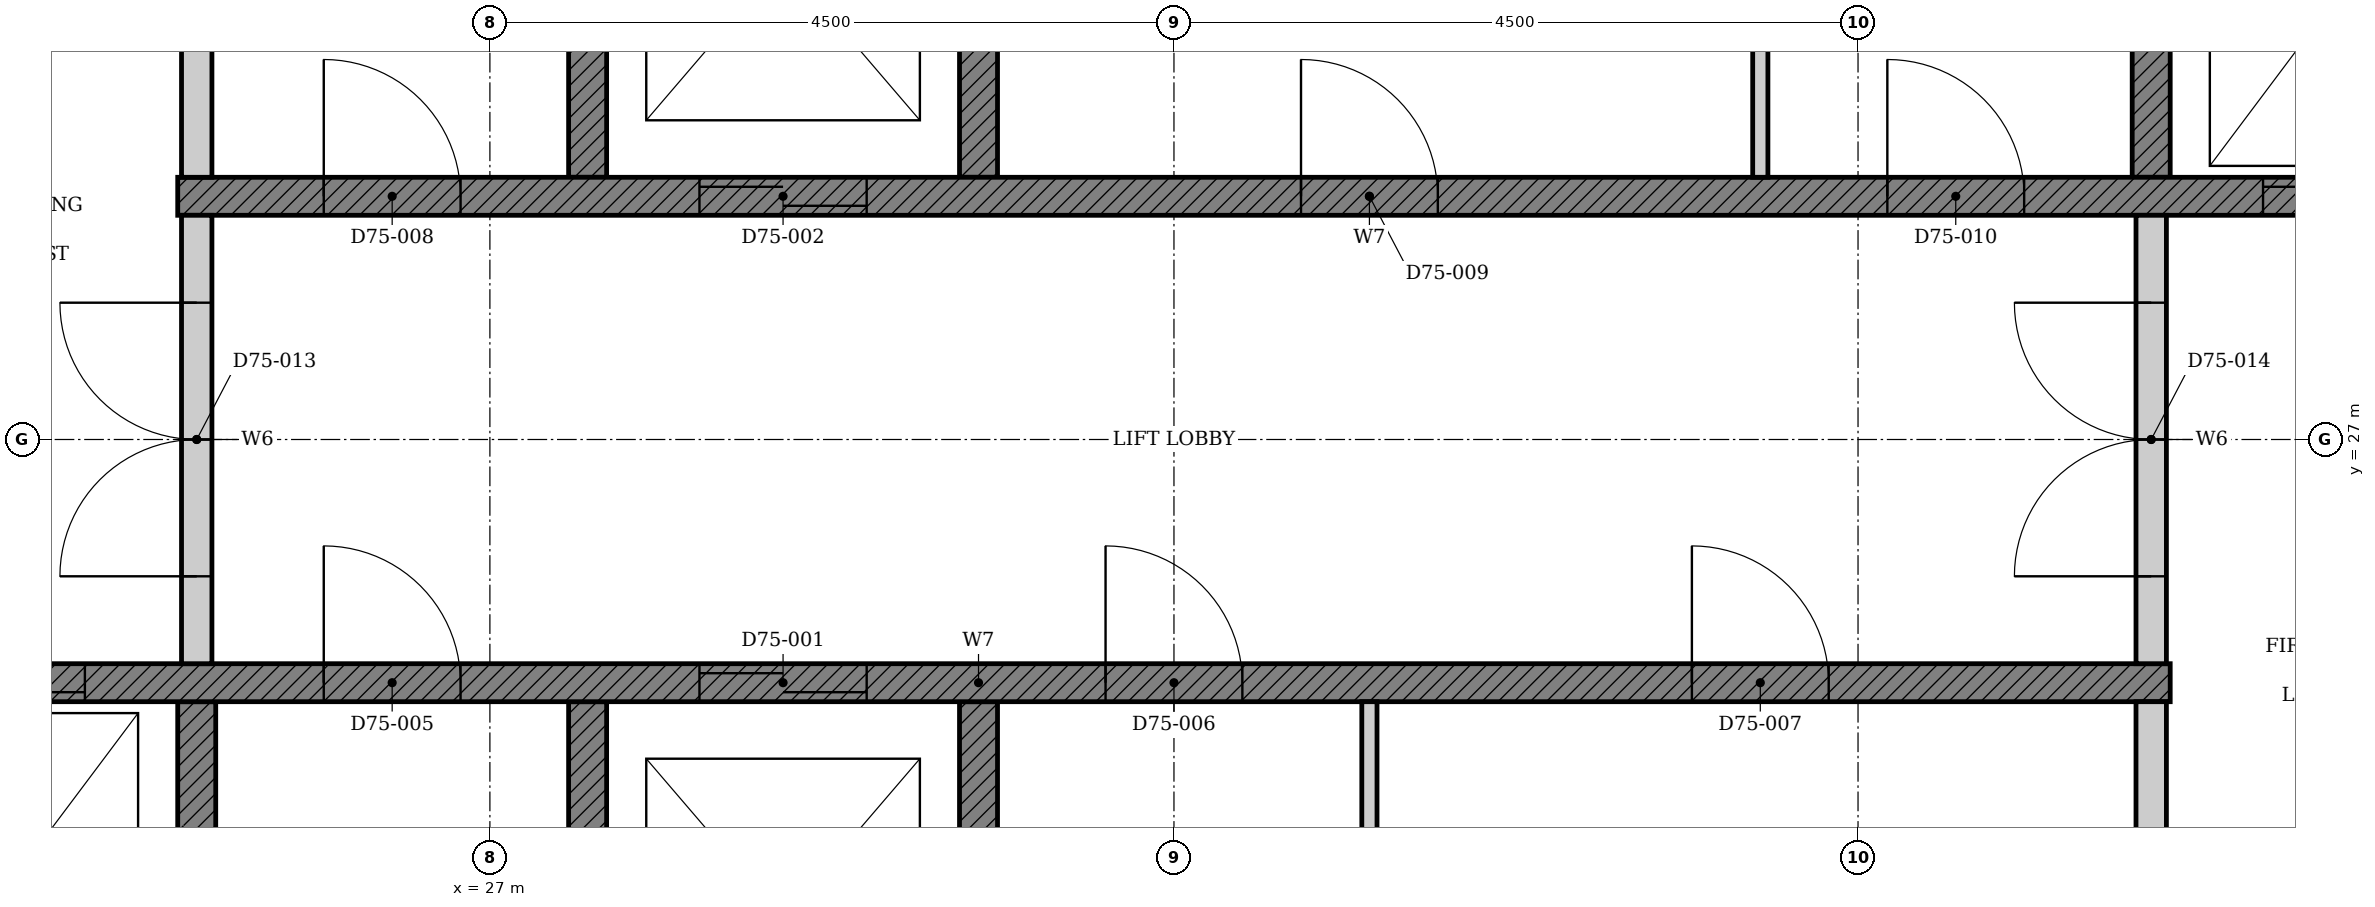
"""IFC4 building model, lengths in metres.
Left out: names, types, materials, properties, quantities, classifications, styles, units other than length and angle.
Written with IfcOpenShell. Run it as: python <this file> out.ifc"""

import sys

from ifc_helpers import new_model, si_unit, direction, frame, frame_2d, origin, place, context, subcontext, project, spatial, polyline, rectangle, outline, extrude, element, fill, save


model = new_model("IFC4")
c1 = context("Model", 3, precision=1e-05, world=origin(), true_north=direction((0.0, 1.0)))
c2 = subcontext(c1, "Body", "Model", "MODEL_VIEW")
j1 = project(units=[si_unit("LENGTHUNIT", "METRE"), si_unit("PLANEANGLEUNIT", "RADIAN")], contexts=[c1])
p1 = place(None, origin())
s1 = spatial("IfcSite", under=j1, at=p1, CompositionType="ELEMENT")
p2 = place(p1, origin())
s2 = spatial("IfcBuilding", under=s1, at=p2, CompositionType="ELEMENT")
p3 = place(p2, frame((0.0, 0.0, 294.5)))
s3 = spatial("IfcBuildingStorey", under=s2, at=p3, CompositionType="ELEMENT", Elevation=294.5)
p4 = place(p3, origin())
e1 = element("IfcWall", 1, at=p4, inside=s3, PredefinedType="SHEAR", context=c2, shape_type="SweptSolid", body=[
    extrude(outline(polyline([(22.375, 22.35), (25.197, 22.35), (25.197, 25.275), (24.947, 25.275), (24.947, 22.65), (22.625, 22.65), (22.625, 25.275), (22.375, 25.275), (22.375, 22.35)])), origin(), (0.0, 0.0, 1.0), 3.4),
])
p5 = place(p3, origin())
e2 = element("IfcWall", 2, at=p5, inside=s3, PredefinedType="SHEAR", context=c2, shape_type="SweptSolid", body=[
    extrude(outline(polyline([(27.518, 22.35), (30.339, 22.35), (30.339, 25.275), (30.089, 25.275), (30.089, 22.65), (27.768, 22.65), (27.768, 25.275), (27.518, 25.275), (27.518, 22.35)])), origin(), (0.0, 0.0, 1.0), 3.4),
])
p6 = place(p3, origin())
e3 = element("IfcWall", 3, at=p6, inside=s3, PredefinedType="SHEAR", context=c2, shape_type="SweptSolid", body=[
    extrude(outline(polyline([(27.518, 28.725), (27.768, 28.725), (27.768, 31.35), (30.089, 31.35), (30.089, 28.725), (30.339, 28.725), (30.339, 31.65), (27.518, 31.65), (27.518, 28.725)])), origin(), (0.0, 0.0, 1.0), 3.4),
])
p7 = place(p3, origin())
e4 = element("IfcWall", 4, at=p7, inside=s3, PredefinedType="SHEAR", context=c2, shape_type="SweptSolid", body=[
    extrude(outline(polyline([(37.803, 28.725), (38.053, 28.725), (38.053, 31.35), (40.375, 31.35), (40.375, 28.725), (40.625, 28.725), (40.625, 31.65), (37.803, 31.65), (37.803, 28.725)])), origin(), (0.0, 0.0, 1.0), 3.4),
])
p8 = place(p3, frame((22.375, 25.4, 0.0), z_axis=(0.0, 0.0, 1.0), x_axis=(1.0, 0.0, 0.0)))
e5 = element("IfcWall", 5, at=p8, inside=s3, PredefinedType="SHEAR", context=c2, shape_type="SweptSolid", body=[
    extrude(rectangle(XDim=15.678, YDim=0.25, at=frame_2d((7.839, 0.0))), origin(), (0.0, 0.0, 1.0), 3.4),
])
p9 = place(p8, frame((6.004, 0.0, 0.0)))
e6 = element("IfcOpeningElement", 6, at=p9, cuts=e5, PredefinedType="OPENING", context=c2, shape_type="SweptSolid", body=[
    extrude(rectangle(XDim=1.1, YDim=2.1, at=frame_2d((0.55, 1.05))), frame((0.0, 0.135, 0.0), z_axis=(0.0, -1.0, 0.0), x_axis=(1.0, 0.0, 0.0)), (0.0, 0.0, 1.0), 0.27),
])
p10 = place(p8, frame((0.861, 0.0, 0.0)))
e7 = element("IfcOpeningElement", 7, at=p10, cuts=e5, PredefinedType="OPENING", context=c2, shape_type="SweptSolid", body=[
    extrude(rectangle(XDim=1.1, YDim=2.1, at=frame_2d((0.55, 1.05))), frame((0.0, 0.135, 0.0), z_axis=(0.0, -1.0, 0.0), x_axis=(1.0, 0.0, 0.0)), (0.0, 0.0, 1.0), 0.27),
])
p11 = place(p8, frame((3.532, 0.0, 0.0)))
e8 = element("IfcOpeningElement", 8, at=p11, cuts=e5, PredefinedType="OPENING", context=c2, shape_type="SweptSolid", body=[
    extrude(rectangle(XDim=0.9, YDim=2.1, at=frame_2d((0.45, 1.05))), frame((0.0, 0.135, 0.0), z_axis=(0.0, -1.0, 0.0), x_axis=(1.0, 0.0, 0.0)), (0.0, 0.0, 1.0), 0.27),
])
p12 = place(p8, frame((8.675, 0.0, 0.0)))
e9 = element("IfcOpeningElement", 9, at=p12, cuts=e5, PredefinedType="OPENING", context=c2, shape_type="SweptSolid", body=[
    extrude(rectangle(XDim=0.9, YDim=2.1, at=frame_2d((0.45, 1.05))), frame((0.0, 0.135, 0.0), z_axis=(0.0, -1.0, 0.0), x_axis=(1.0, 0.0, 0.0)), (0.0, 0.0, 1.0), 0.27),
])
p13 = place(p8, frame((12.532, 0.0, 0.0)))
e10 = element("IfcOpeningElement", 10, at=p13, cuts=e5, PredefinedType="OPENING", context=c2, shape_type="SweptSolid", body=[
    extrude(rectangle(XDim=0.9, YDim=2.1, at=frame_2d((0.45, 1.05))), frame((0.0, 0.135, 0.0), z_axis=(0.0, -1.0, 0.0), x_axis=(1.0, 0.0, 0.0)), (0.0, 0.0, 1.0), 0.27),
])
p14 = place(p3, frame((24.947, 28.6, 0.0), z_axis=(0.0, 0.0, 1.0), x_axis=(1.0, 0.0, 0.0)))
e11 = element("IfcWall", 11, at=p14, inside=s3, PredefinedType="SHEAR", context=c2, shape_type="SweptSolid", body=[
    extrude(rectangle(XDim=15.678, YDim=0.25, at=frame_2d((7.839, 0.0))), origin(), (0.0, 0.0, 1.0), 3.4),
])
p15 = place(p14, frame((3.432, 0.0, 0.0)))
e12 = element("IfcOpeningElement", 12, at=p15, cuts=e11, PredefinedType="OPENING", context=c2, shape_type="SweptSolid", body=[
    extrude(rectangle(XDim=1.1, YDim=2.1, at=frame_2d((0.55, 1.05))), frame((0.0, 0.135, 0.0), z_axis=(0.0, -1.0, 0.0), x_axis=(1.0, 0.0, 0.0)), (0.0, 0.0, 1.0), 0.27),
])
p16 = place(p14, frame((13.718, 0.0, 0.0)))
e13 = element("IfcOpeningElement", 13, at=p16, cuts=e11, PredefinedType="OPENING", context=c2, shape_type="SweptSolid", body=[
    extrude(rectangle(XDim=1.1, YDim=2.1, at=frame_2d((0.55, 1.05))), frame((0.0, 0.135, 0.0), z_axis=(0.0, -1.0, 0.0), x_axis=(1.0, 0.0, 0.0)), (0.0, 0.0, 1.0), 0.27),
])
p17 = place(p14, frame((0.961, 0.0, 0.0)))
e14 = element("IfcOpeningElement", 14, at=p17, cuts=e11, PredefinedType="OPENING", context=c2, shape_type="SweptSolid", body=[
    extrude(rectangle(XDim=0.9, YDim=2.1, at=frame_2d((0.45, 1.05))), frame((0.0, 0.135, 0.0), z_axis=(0.0, -1.0, 0.0), x_axis=(1.0, 0.0, 0.0)), (0.0, 0.0, 1.0), 0.27),
])
p18 = place(p14, frame((7.389, 0.0, 0.0)))
e15 = element("IfcOpeningElement", 15, at=p18, cuts=e11, PredefinedType="OPENING", context=c2, shape_type="SweptSolid", body=[
    extrude(rectangle(XDim=0.9, YDim=2.1, at=frame_2d((0.45, 1.05))), frame((0.0, 0.135, 0.0), z_axis=(0.0, -1.0, 0.0), x_axis=(1.0, 0.0, 0.0)), (0.0, 0.0, 1.0), 0.27),
])
p19 = place(p14, frame((11.246, 0.0, 0.0)))
e16 = element("IfcOpeningElement", 16, at=p19, cuts=e11, PredefinedType="OPENING", context=c2, shape_type="SweptSolid", body=[
    extrude(rectangle(XDim=0.9, YDim=2.1, at=frame_2d((0.45, 1.05))), frame((0.0, 0.135, 0.0), z_axis=(0.0, -1.0, 0.0), x_axis=(1.0, 0.0, 0.0)), (0.0, 0.0, 1.0), 0.27),
])
p20 = place(p3, frame((37.928, 22.65, 0.0), z_axis=(0.0, 0.0, 1.0), x_axis=(0.0, 1.0, 0.0)))
e17 = element("IfcWall", 17, at=p20, inside=s3, PredefinedType="PARTITIONING", context=c2, shape_type="SweptSolid", body=[
    extrude(rectangle(XDim=2.625, YDim=0.2, at=frame_2d((1.312, 0.0))), origin(), (0.0, 0.0, 1.0), 3.4),
])
p21 = place(p3, frame((32.786, 22.65, 0.0), z_axis=(0.0, 0.0, 1.0), x_axis=(0.0, 1.0, 0.0)))
e18 = element("IfcWall", 18, at=p21, inside=s3, PredefinedType="PARTITIONING", context=c2, shape_type="SweptSolid", body=[
    extrude(rectangle(XDim=2.625, YDim=0.1, at=frame_2d((1.312, 0.0))), origin(), (0.0, 0.0, 1.0), 3.4),
])
p22 = place(p3, frame((25.072, 28.725, 0.0), z_axis=(0.0, 0.0, 1.0), x_axis=(0.0, 1.0, 0.0)))
e19 = element("IfcWall", 19, at=p22, inside=s3, PredefinedType="PARTITIONING", context=c2, shape_type="SweptSolid", body=[
    extrude(rectangle(XDim=2.625, YDim=0.2, at=frame_2d((1.312, 0.0))), origin(), (0.0, 0.0, 1.0), 3.4),
])
p23 = place(p3, frame((35.357, 28.725, 0.0), z_axis=(0.0, 0.0, 1.0), x_axis=(0.0, 1.0, 0.0)))
e20 = element("IfcWall", 20, at=p23, inside=s3, PredefinedType="PARTITIONING", context=c2, shape_type="SweptSolid", body=[
    extrude(rectangle(XDim=2.625, YDim=0.1, at=frame_2d((1.312, 0.0))), origin(), (0.0, 0.0, 1.0), 3.4),
])
p24 = place(p3, frame((25.072, 25.525, 0.0), z_axis=(0.0, 0.0, 1.0), x_axis=(0.0, 1.0, 0.0)))
e21 = element("IfcWall", 21, at=p24, inside=s3, PredefinedType="PARTITIONING", context=c2, shape_type="SweptSolid", body=[
    extrude(rectangle(XDim=2.95, YDim=0.2, at=frame_2d((1.475, 0.0))), origin(), (0.0, 0.0, 1.0), 3.4),
])
p25 = place(p24, frame((0.575, 0.0, 0.0)))
e22 = element("IfcOpeningElement", 22, at=p25, cuts=e21, PredefinedType="OPENING", context=c2, shape_type="SweptSolid", body=[
    extrude(rectangle(XDim=1.8, YDim=2.1, at=frame_2d((0.9, 1.05))), frame((0.0, 0.11, 0.0), z_axis=(0.0, -1.0, 0.0), x_axis=(1.0, 0.0, 0.0)), (0.0, 0.0, 1.0), 0.22),
])
p26 = place(p3, frame((37.928, 25.525, 0.0), z_axis=(0.0, 0.0, 1.0), x_axis=(0.0, 1.0, 0.0)))
e23 = element("IfcWall", 23, at=p26, inside=s3, PredefinedType="PARTITIONING", context=c2, shape_type="SweptSolid", body=[
    extrude(rectangle(XDim=2.95, YDim=0.2, at=frame_2d((1.475, 0.0))), origin(), (0.0, 0.0, 1.0), 3.4),
])
p27 = place(p26, frame((0.575, 0.0, 0.0)))
e24 = element("IfcOpeningElement", 24, at=p27, cuts=e23, PredefinedType="OPENING", context=c2, shape_type="SweptSolid", body=[
    extrude(rectangle(XDim=1.8, YDim=2.1, at=frame_2d((0.9, 1.05))), frame((0.0, 0.11, 0.0), z_axis=(0.0, -1.0, 0.0), x_axis=(1.0, 0.0, 0.0)), (0.0, 0.0, 1.0), 0.22),
])
p28 = place(p9, origin())
e25 = element("IfcDoor", 25, at=p28, inside=s3, OperationType="DOUBLE_DOOR_SLIDING", PredefinedType="DOOR", context=c2, shape_type="SweptSolid", body=[
    extrude(rectangle(XDim=1.1, YDim=2.1, at=frame_2d((0.55, 1.05))), frame((0.0, 0.025, 0.0), z_axis=(0.0, -1.0, 0.0), x_axis=(1.0, 0.0, 0.0)), (0.0, 0.0, 1.0), 0.05),
])
fill(e6, e25)
p29 = place(p15, origin())
e26 = element("IfcDoor", 26, at=p29, inside=s3, OperationType="DOUBLE_DOOR_SLIDING", PredefinedType="DOOR", context=c2, shape_type="SweptSolid", body=[
    extrude(rectangle(XDim=1.1, YDim=2.1, at=frame_2d((0.55, 1.05))), frame((0.0, 0.025, 0.0), z_axis=(0.0, -1.0, 0.0), x_axis=(1.0, 0.0, 0.0)), (0.0, 0.0, 1.0), 0.05),
])
fill(e12, e26)
p30 = place(p10, origin())
e27 = element("IfcDoor", 27, at=p30, inside=s3, OperationType="DOUBLE_DOOR_SLIDING", PredefinedType="DOOR", context=c2, shape_type="SweptSolid", body=[
    extrude(rectangle(XDim=1.1, YDim=2.1, at=frame_2d((0.55, 1.05))), frame((0.0, 0.025, 0.0), z_axis=(0.0, -1.0, 0.0), x_axis=(1.0, 0.0, 0.0)), (0.0, 0.0, 1.0), 0.05),
])
fill(e7, e27)
p31 = place(p16, origin())
e28 = element("IfcDoor", 28, at=p31, inside=s3, OperationType="DOUBLE_DOOR_SLIDING", PredefinedType="DOOR", context=c2, shape_type="SweptSolid", body=[
    extrude(rectangle(XDim=1.1, YDim=2.1, at=frame_2d((0.55, 1.05))), frame((0.0, 0.025, 0.0), z_axis=(0.0, -1.0, 0.0), x_axis=(1.0, 0.0, 0.0)), (0.0, 0.0, 1.0), 0.05),
])
fill(e13, e28)
p32 = place(p11, origin())
e29 = element("IfcDoor", 29, at=p32, inside=s3, OperationType="SINGLE_SWING_LEFT", PredefinedType="DOOR", context=c2, shape_type="SweptSolid", body=[
    extrude(rectangle(XDim=0.9, YDim=2.1, at=frame_2d((0.45, 1.05))), frame((0.0, 0.025, 0.0), z_axis=(0.0, -1.0, 0.0), x_axis=(1.0, 0.0, 0.0)), (0.0, 0.0, 1.0), 0.05),
])
fill(e8, e29)
p33 = place(p12, origin())
e30 = element("IfcDoor", 30, at=p33, inside=s3, OperationType="SINGLE_SWING_LEFT", PredefinedType="DOOR", context=c2, shape_type="SweptSolid", body=[
    extrude(rectangle(XDim=0.9, YDim=2.1, at=frame_2d((0.45, 1.05))), frame((0.0, 0.025, 0.0), z_axis=(0.0, -1.0, 0.0), x_axis=(1.0, 0.0, 0.0)), (0.0, 0.0, 1.0), 0.05),
])
fill(e9, e30)
p34 = place(p13, origin())
e31 = element("IfcDoor", 31, at=p34, inside=s3, OperationType="SINGLE_SWING_LEFT", PredefinedType="DOOR", context=c2, shape_type="SweptSolid", body=[
    extrude(rectangle(XDim=0.9, YDim=2.1, at=frame_2d((0.45, 1.05))), frame((0.0, 0.025, 0.0), z_axis=(0.0, -1.0, 0.0), x_axis=(1.0, 0.0, 0.0)), (0.0, 0.0, 1.0), 0.05),
])
fill(e10, e31)
p35 = place(p17, origin())
e32 = element("IfcDoor", 32, at=p35, inside=s3, OperationType="SINGLE_SWING_LEFT", PredefinedType="DOOR", context=c2, shape_type="SweptSolid", body=[
    extrude(rectangle(XDim=0.9, YDim=2.1, at=frame_2d((0.45, 1.05))), frame((0.0, 0.025, 0.0), z_axis=(0.0, -1.0, 0.0), x_axis=(1.0, 0.0, 0.0)), (0.0, 0.0, 1.0), 0.05),
])
fill(e14, e32)
p36 = place(p18, origin())
e33 = element("IfcDoor", 33, at=p36, inside=s3, OperationType="SINGLE_SWING_LEFT", PredefinedType="DOOR", context=c2, shape_type="SweptSolid", body=[
    extrude(rectangle(XDim=0.9, YDim=2.1, at=frame_2d((0.45, 1.05))), frame((0.0, 0.025, 0.0), z_axis=(0.0, -1.0, 0.0), x_axis=(1.0, 0.0, 0.0)), (0.0, 0.0, 1.0), 0.05),
])
fill(e15, e33)
p37 = place(p19, origin())
e34 = element("IfcDoor", 34, at=p37, inside=s3, OperationType="SINGLE_SWING_LEFT", PredefinedType="DOOR", context=c2, shape_type="SweptSolid", body=[
    extrude(rectangle(XDim=0.9, YDim=2.1, at=frame_2d((0.45, 1.05))), frame((0.0, 0.025, 0.0), z_axis=(0.0, -1.0, 0.0), x_axis=(1.0, 0.0, 0.0)), (0.0, 0.0, 1.0), 0.05),
])
fill(e16, e34)
p38 = place(p25, origin())
e35 = element("IfcDoor", 35, at=p38, inside=s3, OperationType="DOUBLE_DOOR_SINGLE_SWING", PredefinedType="DOOR", context=c2, shape_type="SweptSolid", body=[
    extrude(rectangle(XDim=1.8, YDim=2.1, at=frame_2d((0.9, 1.05))), frame((0.0, 0.025, 0.0), z_axis=(0.0, -1.0, 0.0), x_axis=(1.0, 0.0, 0.0)), (0.0, 0.0, 1.0), 0.05),
])
fill(e22, e35)
p39 = place(p27, origin())
e36 = element("IfcDoor", 36, at=p39, inside=s3, OperationType="DOUBLE_DOOR_SINGLE_SWING", PredefinedType="DOOR", context=c2, shape_type="SweptSolid", body=[
    extrude(rectangle(XDim=1.8, YDim=2.1, at=frame_2d((0.9, 1.05))), frame((0.0, 0.025, 0.0), z_axis=(0.0, -1.0, 0.0), x_axis=(1.0, 0.0, 0.0)), (0.0, 0.0, 1.0), 0.05),
])
fill(e24, e36)
save(model, sys.argv[1])
